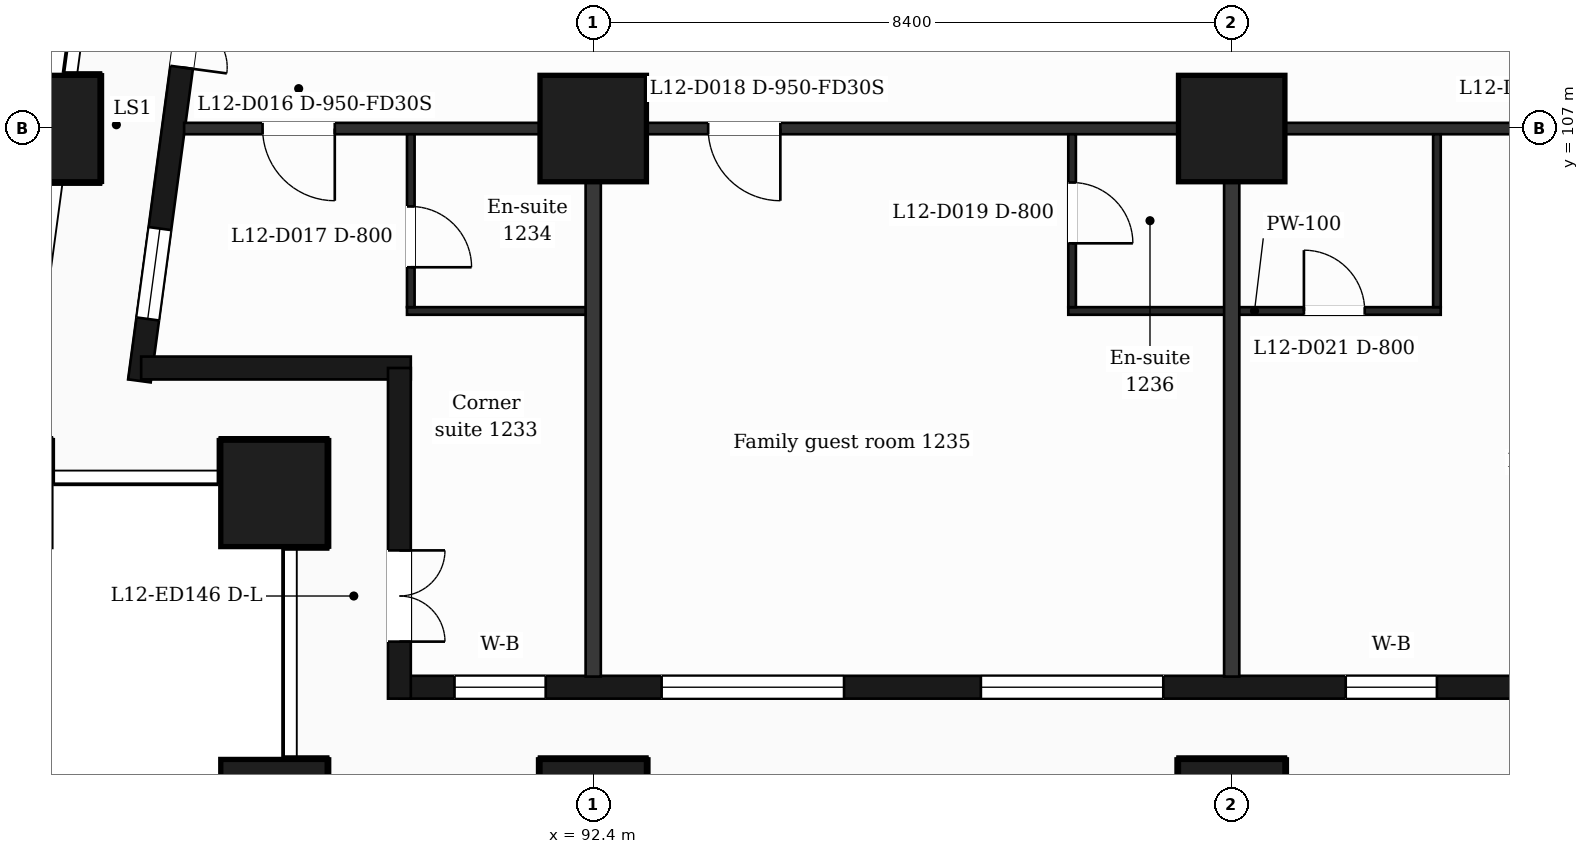
"""IFC4 building model, lengths in metres.
Left out: names, types, materials, properties, quantities, classifications, styles, units other than length and angle.
Written with IfcOpenShell. Run it as: python <this file> out.ifc"""

import sys

from ifc_helpers import new_model, si_unit, direction, frame, frame_2d, origin, origin_2d, place, context, subcontext, project, spatial, rectangle, extrude, element, fill, save


model = new_model("IFC4")
c1 = context("Model", 3, precision=1e-05, world=origin(), true_north=direction((0.0, 1.0)))
c2 = subcontext(c1, "Body", "Model", "MODEL_VIEW")
j1 = project(units=[si_unit("LENGTHUNIT", "METRE"), si_unit("PLANEANGLEUNIT", "RADIAN")], contexts=[c1])
p1 = place(None, origin())
s1 = spatial("IfcSite", under=j1, at=p1, CompositionType="ELEMENT")
p2 = place(p1, origin())
s2 = spatial("IfcBuilding", under=s1, at=p2, CompositionType="ELEMENT")
p3 = place(p2, frame((0.0, 0.0, 60.0)))
s3 = spatial("IfcBuildingStorey", under=s2, at=p3, CompositionType="ELEMENT", Elevation=60.0)
for number, where, z_axis, x_axis in (
    (1, (92.4, 98.0, 0.0), (0.0, 0.0, 1.0), (1.0, 0.0, 0.0)),
    (2, (100.8, 98.0, 0.0), (0.0, 0.0, 1.0), (1.0, 0.0, 0.0)),
    (3, (88.2, 98.0, 0.0), (0.0, 0.0, 1.0), (1.0, 0.0, 0.0)),
    (4, (88.2, 102.2, 0.0), (0.0, 0.0, 1.0), (1.0, 0.0, 0.0)),
    (5, (92.4, 107.0, 0.0), (0.0, 0.0, 1.0), (1.0, 0.0, 0.0)),
    (6, (100.8, 107.0, 0.0), (0.0, 0.0, 1.0), (1.0, 0.0, 0.0)),
    (7, (85.211, 107.0, 0.0), (0.0, 0.0, 1.0), (1.0, 0.0, 0.0)),
):
    element("IfcColumn", number, at=place(p3, frame(where, z_axis=z_axis, x_axis=x_axis)), inside=s3, PredefinedType="COLUMN", context=c2, shape_type="SweptSolid", body=[
        extrude(rectangle(XDim=1.4, YDim=1.4, at=origin_2d()), origin(), (0.0, 0.0, 1.0), 3.5),
    ])
p4 = place(p3, frame((89.85, 99.65, 0.0), z_axis=(0.0, 0.0, 1.0), x_axis=(1.0, 0.0, 0.0)))
e8 = element("IfcWall", 8, at=p4, inside=s3, PredefinedType="SOLIDWALL", context=c2, shape_type="SweptSolid", body=[
    extrude(rectangle(XDim=47.25, YDim=0.3, at=frame_2d((23.625, 0.0))), origin(), (0.0, 0.0, 1.0), 3.18),
])
p5 = place(p4, frame((0.725, 0.0, 0.9)))
e9 = element("IfcOpeningElement", 9, at=p5, cuts=e8, PredefinedType="OPENING", context=c2, shape_type="SweptSolid", body=[
    extrude(rectangle(XDim=1.2, YDim=2.1, at=frame_2d((0.6, 1.05))), frame((0.0, 0.16, 0.0), z_axis=(0.0, -1.0, 0.0), x_axis=(1.0, 0.0, 0.0)), (0.0, 0.0, 1.0), 0.32),
])
p6 = place(p4, frame((3.45, 0.0, 0.9)))
e10 = element("IfcOpeningElement", 10, at=p6, cuts=e8, PredefinedType="OPENING", context=c2, shape_type="SweptSolid", body=[
    extrude(rectangle(XDim=2.4, YDim=2.1, at=frame_2d((1.2, 1.05))), frame((0.0, 0.16, 0.0), z_axis=(0.0, -1.0, 0.0), x_axis=(1.0, 0.0, 0.0)), (0.0, 0.0, 1.0), 0.32),
])
p7 = place(p4, frame((7.65, 0.0, 0.9)))
e11 = element("IfcOpeningElement", 11, at=p7, cuts=e8, PredefinedType="OPENING", context=c2, shape_type="SweptSolid", body=[
    extrude(rectangle(XDim=2.4, YDim=2.1, at=frame_2d((1.2, 1.05))), frame((0.0, 0.16, 0.0), z_axis=(0.0, -1.0, 0.0), x_axis=(1.0, 0.0, 0.0)), (0.0, 0.0, 1.0), 0.32),
])
p8 = place(p4, frame((12.45, 0.0, 0.9)))
e12 = element("IfcOpeningElement", 12, at=p8, cuts=e8, PredefinedType="OPENING", context=c2, shape_type="SweptSolid", body=[
    extrude(rectangle(XDim=1.2, YDim=2.1, at=frame_2d((0.6, 1.05))), frame((0.0, 0.16, 0.0), z_axis=(0.0, -1.0, 0.0), x_axis=(1.0, 0.0, 0.0)), (0.0, 0.0, 1.0), 0.32),
])
p9 = place(p4, frame((16.65, 0.0, 0.9)))
e13 = element("IfcOpeningElement", 13, at=p9, cuts=e8, PredefinedType="OPENING", context=c2, shape_type="SweptSolid", body=[
    extrude(rectangle(XDim=1.2, YDim=2.1, at=frame_2d((0.6, 1.05))), frame((0.0, 0.16, 0.0), z_axis=(0.0, -1.0, 0.0), x_axis=(1.0, 0.0, 0.0)), (0.0, 0.0, 1.0), 0.32),
])
p10 = place(p4, frame((19.95, 0.0, 0.9)))
e14 = element("IfcOpeningElement", 14, at=p10, cuts=e8, PredefinedType="OPENING", context=c2, shape_type="SweptSolid", body=[
    extrude(rectangle(XDim=1.2, YDim=2.1, at=frame_2d((0.6, 1.05))), frame((0.0, 0.16, 0.0), z_axis=(0.0, -1.0, 0.0), x_axis=(1.0, 0.0, 0.0)), (0.0, 0.0, 1.0), 0.32),
])
p11 = place(p4, frame((21.75, 0.0, 0.9)))
e15 = element("IfcOpeningElement", 15, at=p11, cuts=e8, PredefinedType="OPENING", context=c2, shape_type="SweptSolid", body=[
    extrude(rectangle(XDim=1.2, YDim=2.1, at=frame_2d((0.6, 1.05))), frame((0.0, 0.16, 0.0), z_axis=(0.0, -1.0, 0.0), x_axis=(1.0, 0.0, 0.0)), (0.0, 0.0, 1.0), 0.32),
])
p12 = place(p4, frame((25.05, 0.0, 0.0)))
e16 = element("IfcOpeningElement", 16, at=p12, cuts=e8, PredefinedType="OPENING", context=c2, shape_type="SweptSolid", body=[
    extrude(rectangle(XDim=1.2, YDim=2.4, at=frame_2d((0.6, 1.2))), frame((0.0, 0.16, 0.0), z_axis=(0.0, -1.0, 0.0), x_axis=(1.0, 0.0, 0.0)), (0.0, 0.0, 1.0), 0.32),
])
p13 = place(p4, frame((28.35, 0.0, 0.9)))
e17 = element("IfcOpeningElement", 17, at=p13, cuts=e8, PredefinedType="OPENING", context=c2, shape_type="SweptSolid", body=[
    extrude(rectangle(XDim=1.2, YDim=2.1, at=frame_2d((0.6, 1.05))), frame((0.0, 0.16, 0.0), z_axis=(0.0, -1.0, 0.0), x_axis=(1.0, 0.0, 0.0)), (0.0, 0.0, 1.0), 0.32),
])
p14 = place(p4, frame((30.15, 0.0, 0.9)))
e18 = element("IfcOpeningElement", 18, at=p14, cuts=e8, PredefinedType="OPENING", context=c2, shape_type="SweptSolid", body=[
    extrude(rectangle(XDim=1.2, YDim=2.1, at=frame_2d((0.6, 1.05))), frame((0.0, 0.16, 0.0), z_axis=(0.0, -1.0, 0.0), x_axis=(1.0, 0.0, 0.0)), (0.0, 0.0, 1.0), 0.32),
])
p15 = place(p4, frame((32.85, 0.0, 0.9)))
e19 = element("IfcOpeningElement", 19, at=p15, cuts=e8, PredefinedType="OPENING", context=c2, shape_type="SweptSolid", body=[
    extrude(rectangle(XDim=2.4, YDim=2.1, at=frame_2d((1.2, 1.05))), frame((0.0, 0.16, 0.0), z_axis=(0.0, -1.0, 0.0), x_axis=(1.0, 0.0, 0.0)), (0.0, 0.0, 1.0), 0.32),
])
p16 = place(p4, frame((37.05, 0.0, 0.9)))
e20 = element("IfcOpeningElement", 20, at=p16, cuts=e8, PredefinedType="OPENING", context=c2, shape_type="SweptSolid", body=[
    extrude(rectangle(XDim=2.4, YDim=2.1, at=frame_2d((1.2, 1.05))), frame((0.0, 0.16, 0.0), z_axis=(0.0, -1.0, 0.0), x_axis=(1.0, 0.0, 0.0)), (0.0, 0.0, 1.0), 0.32),
])
p17 = place(p4, frame((41.85, 0.0, 0.9)))
e21 = element("IfcOpeningElement", 21, at=p17, cuts=e8, PredefinedType="OPENING", context=c2, shape_type="SweptSolid", body=[
    extrude(rectangle(XDim=1.2, YDim=2.1, at=frame_2d((0.6, 1.05))), frame((0.0, 0.16, 0.0), z_axis=(0.0, -1.0, 0.0), x_axis=(1.0, 0.0, 0.0)), (0.0, 0.0, 1.0), 0.32),
])
p18 = place(p4, frame((45.25, 0.0, 0.9)))
e22 = element("IfcOpeningElement", 22, at=p18, cuts=e8, PredefinedType="OPENING", context=c2, shape_type="SweptSolid", body=[
    extrude(rectangle(XDim=1.2, YDim=2.1, at=frame_2d((0.6, 1.05))), frame((0.0, 0.16, 0.0), z_axis=(0.0, -1.0, 0.0), x_axis=(1.0, 0.0, 0.0)), (0.0, 0.0, 1.0), 0.32),
])
p19 = place(p3, frame((87.334, 110.4, 0.0), z_axis=(0.0, 0.0, 1.0), x_axis=(-0.133437175554, -0.991057273915, 0.0)))
e23 = element("IfcWall", 23, at=p19, inside=s3, PredefinedType="SOLIDWALL", context=c2, shape_type="SweptSolid", body=[
    extrude(rectangle(XDim=6.781, YDim=0.3, at=frame_2d((3.39, 0.0))), origin(), (0.0, 0.0, 1.0), 3.18),
])
p20 = place(p19, frame((1.418, 0.0, 0.0)))
e24 = element("IfcOpeningElement", 24, at=p20, cuts=e23, PredefinedType="OPENING", context=c2, shape_type="SweptSolid", body=[
    extrude(rectangle(XDim=1.2, YDim=2.4, at=frame_2d((0.6, 1.2))), frame((0.0, 0.16, 0.0), z_axis=(0.0, -1.0, 0.0), x_axis=(1.0, 0.0, 0.0)), (0.0, 0.0, 1.0), 0.32),
])
p21 = place(p19, frame((4.758, 0.0, 0.9)))
e25 = element("IfcOpeningElement", 25, at=p21, cuts=e23, PredefinedType="OPENING", context=c2, shape_type="SweptSolid", body=[
    extrude(rectangle(XDim=1.2, YDim=2.1, at=frame_2d((0.6, 1.05))), frame((0.0, 0.16, 0.0), z_axis=(0.0, -1.0, 0.0), x_axis=(1.0, 0.0, 0.0)), (0.0, 0.0, 1.0), 0.32),
])
p22 = place(p3, frame((86.452, 103.85, 0.0), z_axis=(0.0, 0.0, 1.0), x_axis=(1.0, 0.0, 0.0)))
e26 = element("IfcWall", 26, at=p22, inside=s3, PredefinedType="SOLIDWALL", context=c2, shape_type="SweptSolid", body=[
    extrude(rectangle(XDim=3.548, YDim=0.3, at=frame_2d((1.774, 0.0))), origin(), (0.0, 0.0, 1.0), 3.18),
])
p23 = place(p3, frame((89.85, 103.85, 0.0), z_axis=(0.0, 0.0, 1.0), x_axis=(0.0, -1.0, 0.0)))
e27 = element("IfcWall", 27, at=p23, inside=s3, PredefinedType="SOLIDWALL", context=c2, shape_type="SweptSolid", body=[
    extrude(rectangle(XDim=4.35, YDim=0.3, at=frame_2d((2.175, 0.0))), origin(), (0.0, 0.0, 1.0), 3.18),
])
p24 = place(p23, frame((2.4, 0.0, 0.0)))
e28 = element("IfcOpeningElement", 28, at=p24, cuts=e27, PredefinedType="OPENING", context=c2, shape_type="SweptSolid", body=[
    extrude(rectangle(XDim=1.2, YDim=2.4, at=frame_2d((0.6, 1.2))), frame((0.0, 0.16, 0.0), z_axis=(0.0, -1.0, 0.0), x_axis=(1.0, 0.0, 0.0)), (0.0, 0.0, 1.0), 0.32),
])
p25 = place(p3, frame((89.95, 104.6, 0.0), z_axis=(0.0, 0.0, 1.0), x_axis=(1.0, 0.0, 0.0)))
e29 = element("IfcWall", 29, at=p25, inside=s3, PredefinedType="PARTITIONING", context=c2, shape_type="SweptSolid", body=[
    extrude(rectangle(XDim=2.45, YDim=0.1, at=frame_2d((1.225, 0.0))), origin(), (0.0, 0.0, 1.0), 3.18),
])
p26 = place(p3, frame((98.65, 104.6, 0.0), z_axis=(0.0, 0.0, 1.0), x_axis=(1.0, 0.0, 0.0)))
e30 = element("IfcWall", 30, at=p26, inside=s3, PredefinedType="PARTITIONING", context=c2, shape_type="SweptSolid", body=[
    extrude(rectangle(XDim=4.9, YDim=0.1, at=frame_2d((2.45, 0.0))), origin(), (0.0, 0.0, 1.0), 3.18),
])
p27 = place(p26, frame((3.1, 0.0, 0.0)))
e31 = element("IfcOpeningElement", 31, at=p27, cuts=e30, PredefinedType="OPENING", context=c2, shape_type="SweptSolid", body=[
    extrude(rectangle(XDim=0.8, YDim=2.1, at=frame_2d((0.4, 1.05))), frame((0.0, 0.06, 0.0), z_axis=(0.0, -1.0, 0.0), x_axis=(1.0, 0.0, 0.0)), (0.0, 0.0, 1.0), 0.12),
])
p28 = place(p3, frame((87.018, 107.0, 0.0), z_axis=(0.0, 0.0, 1.0), x_axis=(1.0, 0.0, 0.0)))
e32 = element("IfcWall", 32, at=p28, inside=s3, PredefinedType="PARTITIONING", context=c2, shape_type="SweptSolid", body=[
    extrude(rectangle(XDim=52.765, YDim=0.15, at=frame_2d((26.382, 0.0))), origin(), (0.0, 0.0, 1.0), 3.18),
])
p29 = place(p28, frame((1.032, 0.0, 0.0)))
e33 = element("IfcOpeningElement", 33, at=p29, cuts=e32, PredefinedType="OPENING", context=c2, shape_type="SweptSolid", body=[
    extrude(rectangle(XDim=0.95, YDim=2.1, at=frame_2d((0.475, 1.05))), frame((0.0, 0.085, 0.0), z_axis=(0.0, -1.0, 0.0), x_axis=(1.0, 0.0, 0.0)), (0.0, 0.0, 1.0), 0.17),
])
p30 = place(p28, frame((6.894, 0.0, 0.0)))
e34 = element("IfcOpeningElement", 34, at=p30, cuts=e32, PredefinedType="OPENING", context=c2, shape_type="SweptSolid", body=[
    extrude(rectangle(XDim=0.95, YDim=2.1, at=frame_2d((0.475, 1.05))), frame((0.0, 0.085, 0.0), z_axis=(0.0, -1.0, 0.0), x_axis=(1.0, 0.0, 0.0)), (0.0, 0.0, 1.0), 0.17),
])
p31 = place(p28, frame((17.844, 0.0, 0.0)))
e35 = element("IfcOpeningElement", 35, at=p31, cuts=e32, PredefinedType="OPENING", context=c2, shape_type="SweptSolid", body=[
    extrude(rectangle(XDim=0.95, YDim=2.1, at=frame_2d((0.475, 1.05))), frame((0.0, 0.085, 0.0), z_axis=(0.0, -1.0, 0.0), x_axis=(1.0, 0.0, 0.0)), (0.0, 0.0, 1.0), 0.17),
])
p32 = place(p28, frame((26.245, 0.0, 0.0)))
e36 = element("IfcOpeningElement", 36, at=p32, cuts=e32, PredefinedType="OPENING", context=c2, shape_type="SweptSolid", body=[
    extrude(rectangle(XDim=0.95, YDim=2.1, at=frame_2d((0.475, 1.05))), frame((0.0, 0.085, 0.0), z_axis=(0.0, -1.0, 0.0), x_axis=(1.0, 0.0, 0.0)), (0.0, 0.0, 1.0), 0.17),
])
p33 = place(p28, frame((35.822, 0.0, 0.0)))
e37 = element("IfcOpeningElement", 37, at=p33, cuts=e32, PredefinedType="OPENING", context=c2, shape_type="SweptSolid", body=[
    extrude(rectangle(XDim=0.95, YDim=2.1, at=frame_2d((0.475, 1.05))), frame((0.0, 0.085, 0.0), z_axis=(0.0, -1.0, 0.0), x_axis=(1.0, 0.0, 0.0)), (0.0, 0.0, 1.0), 0.17),
])
p34 = place(p28, frame((42.302, 0.0, 0.0)))
e38 = element("IfcOpeningElement", 38, at=p34, cuts=e32, PredefinedType="OPENING", context=c2, shape_type="SweptSolid", body=[
    extrude(rectangle(XDim=0.95, YDim=2.1, at=frame_2d((0.475, 1.05))), frame((0.0, 0.085, 0.0), z_axis=(0.0, -1.0, 0.0), x_axis=(1.0, 0.0, 0.0)), (0.0, 0.0, 1.0), 0.17),
])
p35 = place(p28, frame((49.285, 0.0, 0.0)))
e39 = element("IfcOpeningElement", 39, at=p35, cuts=e32, PredefinedType="OPENING", context=c2, shape_type="SweptSolid", body=[
    extrude(rectangle(XDim=0.95, YDim=2.1, at=frame_2d((0.475, 1.05))), frame((0.0, 0.085, 0.0), z_axis=(0.0, -1.0, 0.0), x_axis=(1.0, 0.0, 0.0)), (0.0, 0.0, 1.0), 0.17),
])
p36 = place(p3, frame((90.0, 104.65, 0.0), z_axis=(0.0, 0.0, 1.0), x_axis=(0.0, 1.0, 0.0)))
e40 = element("IfcWall", 40, at=p36, inside=s3, PredefinedType="PARTITIONING", context=c2, shape_type="SweptSolid", body=[
    extrude(rectangle(XDim=2.275, YDim=0.1, at=frame_2d((1.138, 0.0))), origin(), (0.0, 0.0, 1.0), 3.18),
])
p37 = place(p36, frame((0.525, 0.0, 0.0)))
e41 = element("IfcOpeningElement", 41, at=p37, cuts=e40, PredefinedType="OPENING", context=c2, shape_type="SweptSolid", body=[
    extrude(rectangle(XDim=0.8, YDim=2.1, at=frame_2d((0.4, 1.05))), frame((0.0, 0.06, 0.0), z_axis=(0.0, -1.0, 0.0), x_axis=(1.0, 0.0, 0.0)), (0.0, 0.0, 1.0), 0.12),
])
p38 = place(p3, frame((92.4, 99.79, 0.0), z_axis=(0.0, 0.0, 1.0), x_axis=(0.0, 1.0, 0.0)))
e42 = element("IfcWall", 42, at=p38, inside=s3, PredefinedType="PARTITIONING", context=c2, shape_type="SweptSolid", body=[
    extrude(rectangle(XDim=7.135, YDim=0.2, at=frame_2d((3.567, 0.0))), origin(), (0.0, 0.0, 1.0), 3.18),
])
p39 = place(p3, frame((98.7, 104.65, 0.0), z_axis=(0.0, 0.0, 1.0), x_axis=(0.0, 1.0, 0.0)))
e43 = element("IfcWall", 43, at=p39, inside=s3, PredefinedType="PARTITIONING", context=c2, shape_type="SweptSolid", body=[
    extrude(rectangle(XDim=2.275, YDim=0.1, at=frame_2d((1.138, 0.0))), origin(), (0.0, 0.0, 1.0), 3.18),
])
p40 = place(p39, frame((0.84, 0.0, 0.0)))
e44 = element("IfcOpeningElement", 44, at=p40, cuts=e43, PredefinedType="OPENING", context=c2, shape_type="SweptSolid", body=[
    extrude(rectangle(XDim=0.8, YDim=2.1, at=frame_2d((0.4, 1.05))), frame((0.0, 0.06, 0.0), z_axis=(0.0, -1.0, 0.0), x_axis=(1.0, 0.0, 0.0)), (0.0, 0.0, 1.0), 0.12),
])
p41 = place(p3, frame((100.8, 99.79, 0.0), z_axis=(0.0, 0.0, 1.0), x_axis=(0.0, 1.0, 0.0)))
e45 = element("IfcWall", 45, at=p41, inside=s3, PredefinedType="PARTITIONING", context=c2, shape_type="SweptSolid", body=[
    extrude(rectangle(XDim=7.135, YDim=0.2, at=frame_2d((3.567, 0.0))), origin(), (0.0, 0.0, 1.0), 3.18),
])
p42 = place(p3, frame((103.5, 104.65, 0.0), z_axis=(0.0, 0.0, 1.0), x_axis=(0.0, 1.0, 0.0)))
e46 = element("IfcWall", 46, at=p42, inside=s3, PredefinedType="PARTITIONING", context=c2, shape_type="SweptSolid", body=[
    extrude(rectangle(XDim=2.275, YDim=0.1, at=frame_2d((1.138, 0.0))), origin(), (0.0, 0.0, 1.0), 3.18),
])
p43 = place(p5, origin())
e47 = element("IfcWindow", 47, at=p43, inside=s3, PartitioningType="SINGLE_PANEL", PredefinedType="WINDOW", context=c2, shape_type="SweptSolid", body=[
    extrude(rectangle(XDim=1.2, YDim=2.1, at=frame_2d((0.6, 1.05))), frame((0.0, 0.03, 0.0), z_axis=(0.0, -1.0, 0.0), x_axis=(1.0, 0.0, 0.0)), (0.0, 0.0, 1.0), 0.06),
])
fill(e9, e47)
p44 = place(p6, origin())
e48 = element("IfcWindow", 48, at=p44, inside=s3, PartitioningType="SINGLE_PANEL", PredefinedType="WINDOW", context=c2, shape_type="SweptSolid", body=[
    extrude(rectangle(XDim=2.4, YDim=2.1, at=frame_2d((1.2, 1.05))), frame((0.0, 0.03, 0.0), z_axis=(0.0, -1.0, 0.0), x_axis=(1.0, 0.0, 0.0)), (0.0, 0.0, 1.0), 0.06),
])
fill(e10, e48)
p45 = place(p7, origin())
e49 = element("IfcWindow", 49, at=p45, inside=s3, PartitioningType="SINGLE_PANEL", PredefinedType="WINDOW", context=c2, shape_type="SweptSolid", body=[
    extrude(rectangle(XDim=2.4, YDim=2.1, at=frame_2d((1.2, 1.05))), frame((0.0, 0.03, 0.0), z_axis=(0.0, -1.0, 0.0), x_axis=(1.0, 0.0, 0.0)), (0.0, 0.0, 1.0), 0.06),
])
fill(e11, e49)
p46 = place(p8, origin())
e50 = element("IfcWindow", 50, at=p46, inside=s3, PartitioningType="SINGLE_PANEL", PredefinedType="WINDOW", context=c2, shape_type="SweptSolid", body=[
    extrude(rectangle(XDim=1.2, YDim=2.1, at=frame_2d((0.6, 1.05))), frame((0.0, 0.03, 0.0), z_axis=(0.0, -1.0, 0.0), x_axis=(1.0, 0.0, 0.0)), (0.0, 0.0, 1.0), 0.06),
])
fill(e12, e50)
p47 = place(p20, origin())
e51 = element("IfcDoor", 51, at=p47, inside=s3, OperationType="DOUBLE_DOOR_SINGLE_SWING", PredefinedType="DOOR", context=c2, shape_type="SweptSolid", body=[
    extrude(rectangle(XDim=1.2, YDim=2.4, at=frame_2d((0.6, 1.2))), frame((0.0, 0.025, 0.0), z_axis=(0.0, -1.0, 0.0), x_axis=(1.0, 0.0, 0.0)), (0.0, 0.0, 1.0), 0.05),
])
fill(e24, e51)
p48 = place(p21, origin())
e52 = element("IfcWindow", 52, at=p48, inside=s3, PartitioningType="SINGLE_PANEL", PredefinedType="WINDOW", context=c2, shape_type="SweptSolid", body=[
    extrude(rectangle(XDim=1.2, YDim=2.1, at=frame_2d((0.6, 1.05))), frame((0.0, 0.03, 0.0), z_axis=(0.0, -1.0, 0.0), x_axis=(1.0, 0.0, 0.0)), (0.0, 0.0, 1.0), 0.06),
])
fill(e25, e52)
p49 = place(p24, origin())
e53 = element("IfcDoor", 53, at=p49, inside=s3, OperationType="DOUBLE_DOOR_SINGLE_SWING", PredefinedType="DOOR", context=c2, shape_type="SweptSolid", body=[
    extrude(rectangle(XDim=1.2, YDim=2.4, at=frame_2d((0.6, 1.2))), frame((0.0, 0.025, 0.0), z_axis=(0.0, -1.0, 0.0), x_axis=(1.0, 0.0, 0.0)), (0.0, 0.0, 1.0), 0.05),
])
fill(e28, e53)
p50 = place(p29, origin())
e54 = element("IfcDoor", 54, at=p50, inside=s3, OperationType="SINGLE_SWING_RIGHT", PredefinedType="DOOR", context=c2, shape_type="SweptSolid", body=[
    extrude(rectangle(XDim=0.95, YDim=2.1, at=frame_2d((0.475, 1.05))), frame((0.0, 0.025, 0.0), z_axis=(0.0, -1.0, 0.0), x_axis=(1.0, 0.0, 0.0)), (0.0, 0.0, 1.0), 0.05),
])
fill(e33, e54)
p51 = place(p37, origin())
e55 = element("IfcDoor", 55, at=p51, inside=s3, OperationType="SINGLE_SWING_LEFT", PredefinedType="DOOR", context=c2, shape_type="SweptSolid", body=[
    extrude(rectangle(XDim=0.8, YDim=2.1, at=frame_2d((0.4, 1.05))), frame((0.0, 0.025, 0.0), z_axis=(0.0, -1.0, 0.0), x_axis=(1.0, 0.0, 0.0)), (0.0, 0.0, 1.0), 0.05),
])
fill(e41, e55)
p52 = place(p30, origin())
e56 = element("IfcDoor", 56, at=p52, inside=s3, OperationType="SINGLE_SWING_RIGHT", PredefinedType="DOOR", context=c2, shape_type="SweptSolid", body=[
    extrude(rectangle(XDim=0.95, YDim=2.1, at=frame_2d((0.475, 1.05))), frame((0.0, 0.025, 0.0), z_axis=(0.0, -1.0, 0.0), x_axis=(1.0, 0.0, 0.0)), (0.0, 0.0, 1.0), 0.05),
])
fill(e34, e56)
p53 = place(p40, origin())
e57 = element("IfcDoor", 57, at=p53, inside=s3, OperationType="SINGLE_SWING_LEFT", PredefinedType="DOOR", context=c2, shape_type="SweptSolid", body=[
    extrude(rectangle(XDim=0.8, YDim=2.1, at=frame_2d((0.4, 1.05))), frame((0.0, 0.025, 0.0), z_axis=(0.0, -1.0, 0.0), x_axis=(1.0, 0.0, 0.0)), (0.0, 0.0, 1.0), 0.05),
])
fill(e44, e57)
p54 = place(p27, origin())
e58 = element("IfcDoor", 58, at=p54, inside=s3, OperationType="SINGLE_SWING_LEFT", PredefinedType="DOOR", context=c2, shape_type="SweptSolid", body=[
    extrude(rectangle(XDim=0.8, YDim=2.1, at=frame_2d((0.4, 1.05))), frame((0.0, 0.025, 0.0), z_axis=(0.0, -1.0, 0.0), x_axis=(1.0, 0.0, 0.0)), (0.0, 0.0, 1.0), 0.05),
])
fill(e31, e58)
save(model, sys.argv[1])
